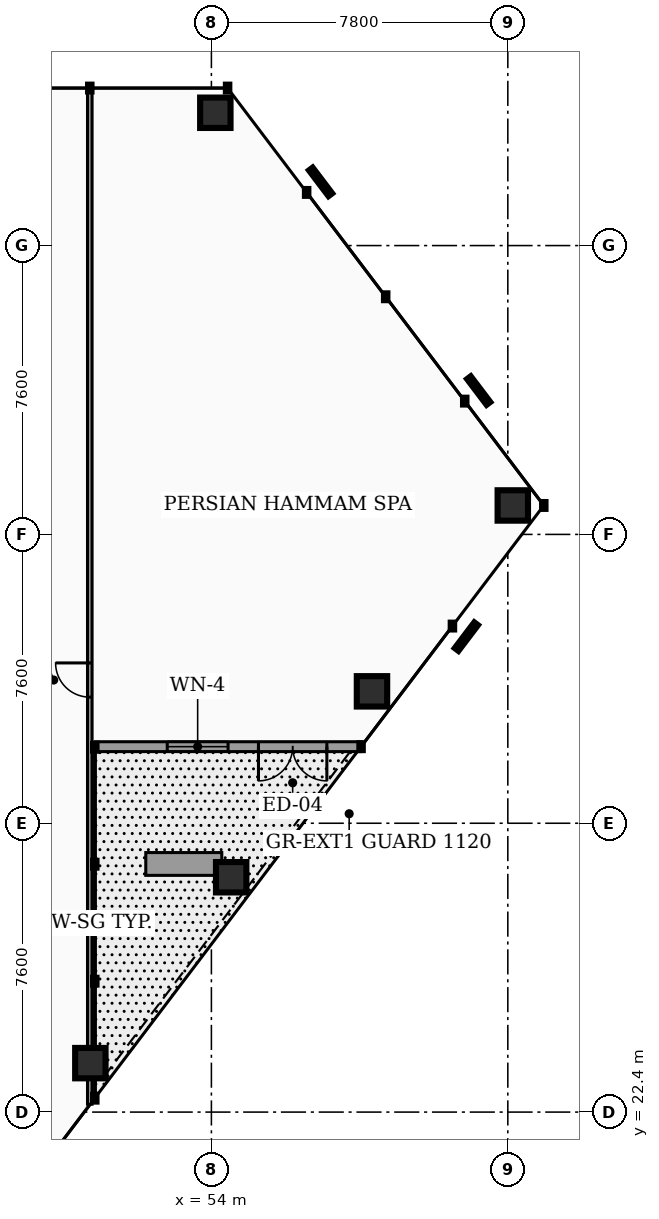
"""IFC4 building model, lengths in metres.
Left out: names, types, materials, properties, quantities, classifications, styles, units other than length and angle.
Written with IfcOpenShell. Run it as: python <this file> out.ifc"""

import sys

from ifc_helpers import new_model, si_unit, direction, frame, frame_2d, origin, origin_2d, place, context, subcontext, project, spatial, rectangle, hollow_rectangle, extrude, element, fill, save


model = new_model("IFC4")
c1 = context("Model", 3, precision=1e-05, world=origin(), true_north=direction((0.0, 1.0)))
c2 = subcontext(c1, "Body", "Model", "MODEL_VIEW")
j1 = project(units=[si_unit("LENGTHUNIT", "METRE"), si_unit("PLANEANGLEUNIT", "RADIAN")], contexts=[c1])
p1 = place(None, origin())
s1 = spatial("IfcSite", under=j1, at=p1, CompositionType="ELEMENT")
p2 = place(p1, origin())
s2 = spatial("IfcBuilding", under=s1, at=p2, CompositionType="ELEMENT")
p3 = place(p2, frame((0.0, 0.0, 114.58)))
s3 = spatial("IfcBuildingStorey", under=s2, at=p3, CompositionType="ELEMENT", Elevation=114.58)
for number, where, z_axis, x_axis in (
    (1, (54.103, 48.694, 0.0), (0.0, 0.0, 1.0), (1.0, 0.0, 0.0)),
    (2, (50.815, 23.688, 0.0), (0.0, 0.0, 1.0), (1.0, 0.0, 0.0)),
):
    element("IfcColumn", number, at=place(p3, frame(where, z_axis=z_axis, x_axis=x_axis)), inside=s3, PredefinedType="COLUMN", context=c2, shape_type="SweptSolid", body=[
        extrude(hollow_rectangle(XDim=0.8, YDim=0.8, WallThickness=0.04, at=origin_2d()), origin(), (0.0, 0.0, 1.0), 4.12),
    ])
p4 = place(p3, frame((54.52, 28.579, 0.0), z_axis=(0.0, 0.0, 1.0), x_axis=(1.0, 0.0, 0.0)))
e3 = element("IfcColumn", 3, at=p4, inside=s3, PredefinedType="COLUMN", context=c2, shape_type="SweptSolid", body=[
    extrude(hollow_rectangle(XDim=0.8, YDim=0.8, WallThickness=0.04, at=origin_2d()), origin(), (0.0, 0.0, 1.0), 4.38),
])
for number, where, z_axis, x_axis in (
    (4, (58.226, 33.471, 0.0), (0.0, 0.0, 1.0), (1.0, 0.0, 0.0)),
    (5, (61.931, 38.362, 0.0), (0.0, 0.0, 1.0), (1.0, 0.0, 0.0)),
):
    element("IfcColumn", number, at=place(p3, frame(where, z_axis=z_axis, x_axis=x_axis)), inside=s3, PredefinedType="COLUMN", context=c2, shape_type="SweptSolid", body=[
        extrude(hollow_rectangle(XDim=0.8, YDim=0.8, WallThickness=0.04, at=origin_2d()), origin(), (0.0, 0.0, 1.0), 4.12),
    ])
p5 = place(p3, frame((57.938, 32.015, 0.0), z_axis=(0.0, 0.0, 1.0), x_axis=(-1.0, 0.0, 0.0)))
e6 = element("IfcWall", 6, at=p5, inside=s3, PredefinedType="STANDARD", context=c2, shape_type="SweptSolid", body=[
    extrude(rectangle(XDim=6.992, YDim=0.26, at=frame_2d((3.496, 0.0))), origin(), (0.0, 0.0, 1.0), 3.65),
])
p6 = place(p5, frame((0.9, 0.0, 0.0)))
e7 = element("IfcOpeningElement", 7, at=p6, cuts=e6, PredefinedType="OPENING", context=c2, shape_type="SweptSolid", body=[
    extrude(rectangle(XDim=1.8, YDim=2.2, at=frame_2d((0.9, 1.1))), frame((0.0, 0.14, 0.0), z_axis=(0.0, -1.0, 0.0), x_axis=(1.0, 0.0, 0.0)), (0.0, 0.0, 1.0), 0.28),
])
p7 = place(p5, frame((3.5, 0.0, 0.75)))
e8 = element("IfcOpeningElement", 8, at=p7, cuts=e6, PredefinedType="OPENING", context=c2, shape_type="SweptSolid", body=[
    extrude(rectangle(XDim=1.6, YDim=1.95, at=frame_2d((0.8, 0.975))), frame((0.0, 0.14, 0.0), z_axis=(0.0, -1.0, 0.0), x_axis=(1.0, 0.0, 0.0)), (0.0, 0.0, 1.0), 0.28),
])
p8 = place(p3, frame((52.273, 28.929, 0.0), z_axis=(0.0, 0.0, 1.0), x_axis=(1.0, 0.0, 0.0)))
e9 = element("IfcWall", 9, at=p8, inside=s3, PredefinedType="PARAPET", context=c2, shape_type="SweptSolid", body=[
    extrude(rectangle(XDim=2.0, YDim=0.6, at=frame_2d((1.0, 0.0))), origin(), (0.0, 0.0, 1.0), 0.6),
])
p9 = place(p3, frame((50.8, 22.607, 0.0), z_axis=(0.0, 0.0, 1.0), x_axis=(0.0, 1.0, 0.0)))
e10 = element("IfcWall", 10, at=p9, inside=s3, PredefinedType="PARTITIONING", context=c2, shape_type="SweptSolid", body=[
    extrude(rectangle(XDim=26.722, YDim=0.12, at=frame_2d((13.361, 0.0))), origin(), (0.0, 0.0, 1.0), 3.077),
])
p10 = place(p9, frame((10.711, 0.0, 0.0)))
e11 = element("IfcOpeningElement", 11, at=p10, cuts=e10, PredefinedType="OPENING", context=c2, shape_type="SweptSolid", body=[
    extrude(rectangle(XDim=0.9, YDim=2.05, at=frame_2d((0.45, 1.025))), frame((0.0, 0.07, 0.0), z_axis=(0.0, -1.0, 0.0), x_axis=(1.0, 0.0, 0.0)), (0.0, 0.0, 1.0), 0.14),
])
p11 = place(p6, origin())
e12 = element("IfcDoor", 12, at=p11, inside=s3, OperationType="DOUBLE_DOOR_SINGLE_SWING", PredefinedType="DOOR", context=c2, shape_type="SweptSolid", body=[
    extrude(rectangle(XDim=1.8, YDim=2.2, at=frame_2d((0.9, 1.1))), frame((0.0, 0.025, 0.0), z_axis=(0.0, -1.0, 0.0), x_axis=(1.0, 0.0, 0.0)), (0.0, 0.0, 1.0), 0.05),
])
fill(e7, e12)
p12 = place(p7, origin())
e13 = element("IfcWindow", 13, at=p12, inside=s3, PartitioningType="SINGLE_PANEL", PredefinedType="WINDOW", context=c2, shape_type="SweptSolid", body=[
    extrude(rectangle(XDim=1.6, YDim=1.95, at=frame_2d((0.8, 0.975))), frame((0.0, 0.03, 0.0), z_axis=(0.0, -1.0, 0.0), x_axis=(1.0, 0.0, 0.0)), (0.0, 0.0, 1.0), 0.06),
])
fill(e8, e13)
p13 = place(p10, origin())
e14 = element("IfcDoor", 14, at=p13, inside=s3, OperationType="SINGLE_SWING_RIGHT", PredefinedType="DOOR", context=c2, shape_type="SweptSolid", body=[
    extrude(rectangle(XDim=0.9, YDim=2.05, at=frame_2d((0.45, 1.025))), frame((0.0, 0.025, 0.0), z_axis=(0.0, -1.0, 0.0), x_axis=(1.0, 0.0, 0.0)), (0.0, 0.0, 1.0), 0.05),
])
fill(e11, e14)
save(model, sys.argv[1])
